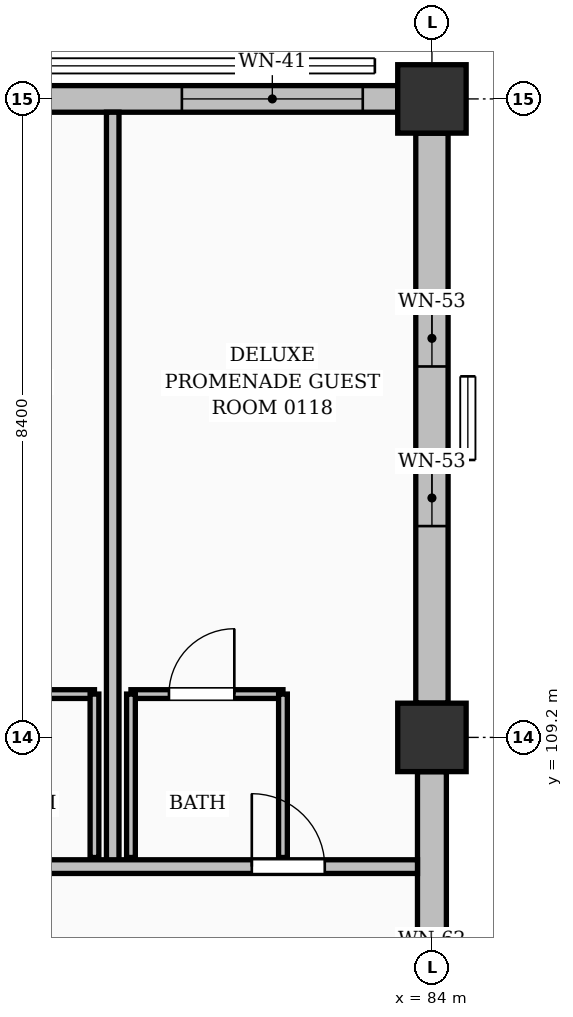
"""IFC4 building model, lengths in metres.
Left out: names, types, materials, properties, quantities, classifications, styles, units other than length and angle.
Written with IfcOpenShell. Run it as: python <this file> out.ifc"""

import sys

from ifc_helpers import new_model, si_unit, direction, frame, frame_2d, origin, origin_2d, place, context, subcontext, project, spatial, rectangle, extrude, element, fill, save


model = new_model("IFC4")
c1 = context("Model", 3, precision=1e-05, world=origin(), true_north=direction((0.0, 1.0)))
c2 = subcontext(c1, "Body", "Model", "MODEL_VIEW")
j1 = project(units=[si_unit("LENGTHUNIT", "METRE"), si_unit("PLANEANGLEUNIT", "RADIAN")], contexts=[c1])
p1 = place(None, origin())
s1 = spatial("IfcSite", under=j1, at=p1, CompositionType="ELEMENT")
p2 = place(p1, origin())
s2 = spatial("IfcBuilding", under=s1, at=p2, CompositionType="ELEMENT")
p3 = place(p2, frame((0.0, 0.0, 3.92)))
s3 = spatial("IfcBuildingStorey", under=s2, at=p3, CompositionType="ELEMENT", Elevation=3.92)
for number, where, z_axis, x_axis in (
    (1, (84.0, 109.2, 0.0), (0.0, 0.0, 1.0), (1.0, 0.0, 0.0)),
    (2, (84.0, 117.6, 0.0), (0.0, 0.0, 1.0), (1.0, 0.0, 0.0)),
):
    element("IfcColumn", number, at=place(p3, frame(where, z_axis=z_axis, x_axis=x_axis)), inside=s3, PredefinedType="COLUMN", context=c2, shape_type="SweptSolid", body=[
        extrude(rectangle(XDim=0.9, YDim=0.9, at=origin_2d()), origin(), (0.0, 0.0, 1.0), 3.64),
    ])
p4 = place(p3, frame((76.001, 117.6, 0.0), z_axis=(0.0, 0.0, 1.0), x_axis=(1.0, 0.0, 0.0)))
e3 = element("IfcWall", 3, at=p4, inside=s3, PredefinedType="SOLIDWALL", context=c2, shape_type="SweptSolid", body=[
    extrude(rectangle(XDim=7.548, YDim=0.35, at=frame_2d((3.774, 0.0))), origin(), (0.0, 0.0, 1.0), 2.445),
])
p5 = place(p4, frame((0.489, 0.0, 0.25)))
e4 = element("IfcOpeningElement", 4, at=p5, cuts=e3, PredefinedType="OPENING", context=c2, shape_type="SweptSolid", body=[
    extrude(rectangle(XDim=2.42, YDim=1.9, at=frame_2d((1.21, 0.95))), frame((0.0, 0.185, 0.0), z_axis=(0.0, -1.0, 0.0), x_axis=(1.0, 0.0, 0.0)), (0.0, 0.0, 1.0), 0.37),
])
p6 = place(p4, frame((4.709, 0.0, 0.25)))
e5 = element("IfcOpeningElement", 5, at=p6, cuts=e3, PredefinedType="OPENING", context=c2, shape_type="SweptSolid", body=[
    extrude(rectangle(XDim=2.38, YDim=2.0, at=frame_2d((1.19, 1.0))), frame((0.0, 0.185, 0.0), z_axis=(0.0, -1.0, 0.0), x_axis=(1.0, 0.0, 0.0)), (0.0, 0.0, 1.0), 0.37),
])
p7 = place(p3, frame((84.0, 101.251, 0.0), z_axis=(0.0, 0.0, 1.0), x_axis=(0.0, 1.0, 0.0)))
e6 = element("IfcWall", 6, at=p7, inside=s3, PredefinedType="SOLIDWALL", context=c2, shape_type="SweptSolid", body=[
    extrude(rectangle(XDim=7.498, YDim=0.38, at=frame_2d((3.749, 0.0))), origin(), (0.0, 0.0, 1.0), 2.495),
])
p8 = place(p7, frame((2.279, 0.0, 0.3)))
e7 = element("IfcOpeningElement", 7, at=p8, cuts=e6, PredefinedType="OPENING", context=c2, shape_type="SweptSolid", body=[
    extrude(rectangle(XDim=0.84, YDim=1.75, at=frame_2d((0.42, 0.875))), frame((0.0, 0.2, 0.0), z_axis=(0.0, -1.0, 0.0), x_axis=(1.0, 0.0, 0.0)), (0.0, 0.0, 1.0), 0.4),
])
p9 = place(p7, frame((4.379, 0.0, 0.3)))
e8 = element("IfcOpeningElement", 8, at=p9, cuts=e6, PredefinedType="OPENING", context=c2, shape_type="SweptSolid", body=[
    extrude(rectangle(XDim=0.84, YDim=1.75, at=frame_2d((0.42, 0.875))), frame((0.0, 0.2, 0.0), z_axis=(0.0, -1.0, 0.0), x_axis=(1.0, 0.0, 0.0)), (0.0, 0.0, 1.0), 0.4),
])
p10 = place(p3, frame((84.0, 109.651, 0.0), z_axis=(0.0, 0.0, 1.0), x_axis=(0.0, 1.0, 0.0)))
e9 = element("IfcWall", 9, at=p10, inside=s3, PredefinedType="SOLIDWALL", context=c2, shape_type="SweptSolid", body=[
    extrude(rectangle(XDim=7.498, YDim=0.425, at=frame_2d((3.749, 0.0))), origin(), (0.0, 0.0, 1.0), 2.695),
])
p11 = place(p10, frame((2.329, 0.0, 0.3)))
e10 = element("IfcOpeningElement", 10, at=p11, cuts=e9, PredefinedType="OPENING", context=c2, shape_type="SweptSolid", body=[
    extrude(rectangle(XDim=0.74, YDim=2.05, at=frame_2d((0.37, 1.025))), frame((0.0, 0.223, 0.0), z_axis=(0.0, -1.0, 0.0), x_axis=(1.0, 0.0, 0.0)), (0.0, 0.0, 1.0), 0.445),
])
p12 = place(p10, frame((4.429, 0.0, 0.3)))
e11 = element("IfcOpeningElement", 11, at=p12, cuts=e9, PredefinedType="OPENING", context=c2, shape_type="SweptSolid", body=[
    extrude(rectangle(XDim=0.74, YDim=2.05, at=frame_2d((0.37, 1.025))), frame((0.0, 0.223, 0.0), z_axis=(0.0, -1.0, 0.0), x_axis=(1.0, 0.0, 0.0)), (0.0, 0.0, 1.0), 0.445),
])
p13 = place(p3, frame((77.56, 109.77, 0.0), z_axis=(0.0, 0.0, 1.0), x_axis=(1.0, 0.0, 0.0)))
e12 = element("IfcWall", 12, at=p13, inside=s3, PredefinedType="PARTITIONING", context=c2, shape_type="SweptSolid", body=[
    extrude(rectangle(XDim=2.0, YDim=0.115, at=frame_2d((1.0, 0.0))), origin(), (0.0, 0.0, 1.0), 3.36),
])
p14 = place(p13, frame((0.5, 0.0, 0.0)))
e13 = element("IfcOpeningElement", 13, at=p14, cuts=e12, PredefinedType="OPENING", context=c2, shape_type="SweptSolid", body=[
    extrude(rectangle(XDim=0.86, YDim=2.05, at=frame_2d((0.43, 1.025))), frame((0.0, 0.067, 0.0), z_axis=(0.0, -1.0, 0.0), x_axis=(1.0, 0.0, 0.0)), (0.0, 0.0, 1.0), 0.135),
])
p15 = place(p3, frame((79.56, 107.62, 0.0), z_axis=(0.0, 0.0, 1.0), x_axis=(0.0, 1.0, 0.0)))
e14 = element("IfcWall", 14, at=p15, inside=s3, PredefinedType="PARTITIONING", context=c2, shape_type="SweptSolid", body=[
    extrude(rectangle(XDim=2.15, YDim=0.115, at=frame_2d((1.075, 0.0))), origin(), (0.0, 0.0, 1.0), 3.36),
])
p16 = place(p3, frame((80.04, 109.77, 0.0), z_axis=(0.0, 0.0, 1.0), x_axis=(1.0, 0.0, 0.0)))
e15 = element("IfcWall", 15, at=p16, inside=s3, PredefinedType="PARTITIONING", context=c2, shape_type="SweptSolid", body=[
    extrude(rectangle(XDim=2.0, YDim=0.115, at=frame_2d((1.0, 0.0))), origin(), (0.0, 0.0, 1.0), 3.36),
])
p17 = place(p16, frame((0.5, 0.0, 0.0)))
e16 = element("IfcOpeningElement", 16, at=p17, cuts=e15, PredefinedType="OPENING", context=c2, shape_type="SweptSolid", body=[
    extrude(rectangle(XDim=0.86, YDim=2.05, at=frame_2d((0.43, 1.025))), frame((0.0, 0.067, 0.0), z_axis=(0.0, -1.0, 0.0), x_axis=(1.0, 0.0, 0.0)), (0.0, 0.0, 1.0), 0.135),
])
p18 = place(p3, frame((80.04, 107.62, 0.0), z_axis=(0.0, 0.0, 1.0), x_axis=(0.0, 1.0, 0.0)))
e17 = element("IfcWall", 17, at=p18, inside=s3, PredefinedType="PARTITIONING", context=c2, shape_type="SweptSolid", body=[
    extrude(rectangle(XDim=2.15, YDim=0.115, at=frame_2d((1.075, 0.0))), origin(), (0.0, 0.0, 1.0), 3.36),
])
p19 = place(p3, frame((82.04, 107.62, 0.0), z_axis=(0.0, 0.0, 1.0), x_axis=(0.0, 1.0, 0.0)))
e18 = element("IfcWall", 18, at=p19, inside=s3, PredefinedType="PARTITIONING", context=c2, shape_type="SweptSolid", body=[
    extrude(rectangle(XDim=2.15, YDim=0.115, at=frame_2d((1.075, 0.0))), origin(), (0.0, 0.0, 1.0), 2.882),
])
p20 = place(p3, frame((79.8, 107.5, 0.0), z_axis=(0.0, 0.0, 1.0), x_axis=(0.0, 1.0, 0.0)))
e19 = element("IfcWall", 19, at=p20, inside=s3, PredefinedType="PARTITIONING", context=c2, shape_type="SweptSolid", body=[
    extrude(rectangle(XDim=9.925, YDim=0.165, at=frame_2d((4.962, 0.0))), origin(), (0.0, 0.0, 1.0), 3.36),
])
p21 = place(p3, frame((40.66, 107.5, 0.0), z_axis=(0.0, 0.0, 1.0), x_axis=(1.0, 0.0, 0.0)))
e20 = element("IfcWall", 20, at=p21, inside=s3, PredefinedType="PARTITIONING", context=c2, shape_type="SweptSolid", body=[
    extrude(rectangle(XDim=43.15, YDim=0.18, at=frame_2d((21.575, 0.0))), origin(), (0.0, 0.0, 1.0), 3.36),
])
p22 = place(p21, frame((0.2, 0.0, 0.0)))
e21 = element("IfcOpeningElement", 21, at=p22, cuts=e20, PredefinedType="OPENING", context=c2, shape_type="SweptSolid", body=[
    extrude(rectangle(XDim=0.94, YDim=2.1, at=frame_2d((0.47, 1.05))), frame((0.0, 0.1, 0.0), z_axis=(0.0, -1.0, 0.0), x_axis=(1.0, 0.0, 0.0)), (0.0, 0.0, 1.0), 0.2),
])
p23 = place(p21, frame((2.71, 0.0, 0.0)))
e22 = element("IfcOpeningElement", 22, at=p23, cuts=e20, PredefinedType="OPENING", context=c2, shape_type="SweptSolid", body=[
    extrude(rectangle(XDim=0.96, YDim=2.15, at=frame_2d((0.48, 1.075))), frame((0.0, 0.1, 0.0), z_axis=(0.0, -1.0, 0.0), x_axis=(1.0, 0.0, 0.0)), (0.0, 0.0, 1.0), 0.2),
])
p24 = place(p21, frame((7.37, 0.0, 0.0)))
e23 = element("IfcOpeningElement", 23, at=p24, cuts=e20, PredefinedType="OPENING", context=c2, shape_type="SweptSolid", body=[
    extrude(rectangle(XDim=0.96, YDim=2.15, at=frame_2d((0.48, 1.075))), frame((0.0, 0.1, 0.0), z_axis=(0.0, -1.0, 0.0), x_axis=(1.0, 0.0, 0.0)), (0.0, 0.0, 1.0), 0.2),
])
p25 = place(p21, frame((11.11, 0.0, 0.0)))
e24 = element("IfcOpeningElement", 24, at=p25, cuts=e20, PredefinedType="OPENING", context=c2, shape_type="SweptSolid", body=[
    extrude(rectangle(XDim=0.96, YDim=2.15, at=frame_2d((0.48, 1.075))), frame((0.0, 0.1, 0.0), z_axis=(0.0, -1.0, 0.0), x_axis=(1.0, 0.0, 0.0)), (0.0, 0.0, 1.0), 0.2),
])
p26 = place(p21, frame((15.77, 0.0, 0.0)))
e25 = element("IfcOpeningElement", 25, at=p26, cuts=e20, PredefinedType="OPENING", context=c2, shape_type="SweptSolid", body=[
    extrude(rectangle(XDim=0.96, YDim=2.15, at=frame_2d((0.48, 1.075))), frame((0.0, 0.1, 0.0), z_axis=(0.0, -1.0, 0.0), x_axis=(1.0, 0.0, 0.0)), (0.0, 0.0, 1.0), 0.2),
])
p27 = place(p21, frame((19.51, 0.0, 0.0)))
e26 = element("IfcOpeningElement", 26, at=p27, cuts=e20, PredefinedType="OPENING", context=c2, shape_type="SweptSolid", body=[
    extrude(rectangle(XDim=0.96, YDim=2.15, at=frame_2d((0.48, 1.075))), frame((0.0, 0.1, 0.0), z_axis=(0.0, -1.0, 0.0), x_axis=(1.0, 0.0, 0.0)), (0.0, 0.0, 1.0), 0.2),
])
p28 = place(p21, frame((24.17, 0.0, 0.0)))
e27 = element("IfcOpeningElement", 27, at=p28, cuts=e20, PredefinedType="OPENING", context=c2, shape_type="SweptSolid", body=[
    extrude(rectangle(XDim=0.96, YDim=2.15, at=frame_2d((0.48, 1.075))), frame((0.0, 0.1, 0.0), z_axis=(0.0, -1.0, 0.0), x_axis=(1.0, 0.0, 0.0)), (0.0, 0.0, 1.0), 0.2),
])
p29 = place(p21, frame((27.91, 0.0, 0.0)))
e28 = element("IfcOpeningElement", 28, at=p29, cuts=e20, PredefinedType="OPENING", context=c2, shape_type="SweptSolid", body=[
    extrude(rectangle(XDim=0.96, YDim=2.15, at=frame_2d((0.48, 1.075))), frame((0.0, 0.1, 0.0), z_axis=(0.0, -1.0, 0.0), x_axis=(1.0, 0.0, 0.0)), (0.0, 0.0, 1.0), 0.2),
])
p30 = place(p21, frame((32.57, 0.0, 0.0)))
e29 = element("IfcOpeningElement", 29, at=p30, cuts=e20, PredefinedType="OPENING", context=c2, shape_type="SweptSolid", body=[
    extrude(rectangle(XDim=0.96, YDim=2.15, at=frame_2d((0.48, 1.075))), frame((0.0, 0.1, 0.0), z_axis=(0.0, -1.0, 0.0), x_axis=(1.0, 0.0, 0.0)), (0.0, 0.0, 1.0), 0.2),
])
p31 = place(p21, frame((36.31, 0.0, 0.0)))
e30 = element("IfcOpeningElement", 30, at=p31, cuts=e20, PredefinedType="OPENING", context=c2, shape_type="SweptSolid", body=[
    extrude(rectangle(XDim=0.96, YDim=2.15, at=frame_2d((0.48, 1.075))), frame((0.0, 0.1, 0.0), z_axis=(0.0, -1.0, 0.0), x_axis=(1.0, 0.0, 0.0)), (0.0, 0.0, 1.0), 0.2),
])
p32 = place(p21, frame((40.97, 0.0, 0.0)))
e31 = element("IfcOpeningElement", 31, at=p32, cuts=e20, PredefinedType="OPENING", context=c2, shape_type="SweptSolid", body=[
    extrude(rectangle(XDim=0.96, YDim=2.15, at=frame_2d((0.48, 1.075))), frame((0.0, 0.1, 0.0), z_axis=(0.0, -1.0, 0.0), x_axis=(1.0, 0.0, 0.0)), (0.0, 0.0, 1.0), 0.2),
])
p33 = place(p6, origin())
e32 = element("IfcWindow", 32, at=p33, inside=s3, PartitioningType="DOUBLE_PANEL_VERTICAL", PredefinedType="WINDOW", context=c2, shape_type="SweptSolid", body=[
    extrude(rectangle(XDim=2.38, YDim=2.0, at=frame_2d((1.19, 1.0))), frame((0.0, 0.03, 0.0), z_axis=(0.0, -1.0, 0.0), x_axis=(1.0, 0.0, 0.0)), (0.0, 0.0, 1.0), 0.06),
])
fill(e5, e32)
p34 = place(p11, origin())
e33 = element("IfcWindow", 33, at=p34, inside=s3, PartitioningType="SINGLE_PANEL", PredefinedType="WINDOW", context=c2, shape_type="SweptSolid", body=[
    extrude(rectangle(XDim=0.74, YDim=2.05, at=frame_2d((0.37, 1.025))), frame((0.0, 0.03, 0.0), z_axis=(0.0, -1.0, 0.0), x_axis=(1.0, 0.0, 0.0)), (0.0, 0.0, 1.0), 0.06),
])
fill(e10, e33)
p35 = place(p12, origin())
e34 = element("IfcWindow", 34, at=p35, inside=s3, PartitioningType="SINGLE_PANEL", PredefinedType="WINDOW", context=c2, shape_type="SweptSolid", body=[
    extrude(rectangle(XDim=0.74, YDim=2.05, at=frame_2d((0.37, 1.025))), frame((0.0, 0.03, 0.0), z_axis=(0.0, -1.0, 0.0), x_axis=(1.0, 0.0, 0.0)), (0.0, 0.0, 1.0), 0.06),
])
fill(e11, e34)
p36 = place(p17, origin())
e35 = element("IfcDoor", 35, at=p36, inside=s3, OperationType="SINGLE_SWING_RIGHT", PredefinedType="DOOR", context=c2, shape_type="SweptSolid", body=[
    extrude(rectangle(XDim=0.86, YDim=2.05, at=frame_2d((0.43, 1.025))), frame((0.0, 0.025, 0.0), z_axis=(0.0, -1.0, 0.0), x_axis=(1.0, 0.0, 0.0)), (0.0, 0.0, 1.0), 0.05),
])
fill(e16, e35)
p37 = place(p32, origin())
e36 = element("IfcDoor", 36, at=p37, inside=s3, OperationType="SINGLE_SWING_LEFT", PredefinedType="DOOR", context=c2, shape_type="SweptSolid", body=[
    extrude(rectangle(XDim=0.96, YDim=2.15, at=frame_2d((0.48, 1.075))), frame((0.0, 0.025, 0.0), z_axis=(0.0, -1.0, 0.0), x_axis=(1.0, 0.0, 0.0)), (0.0, 0.0, 1.0), 0.05),
])
fill(e31, e36)
save(model, sys.argv[1])
